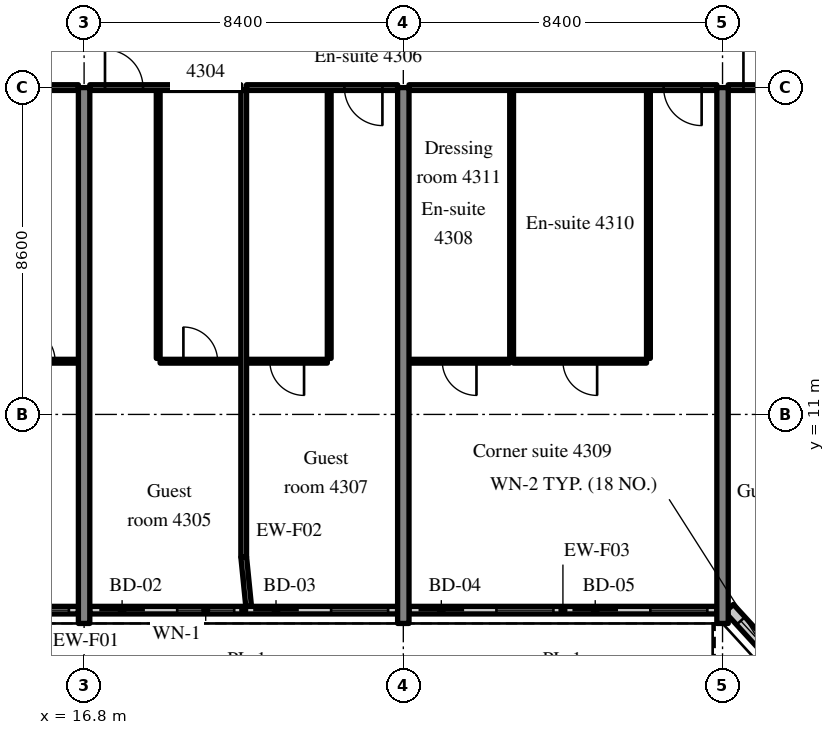
"""IFC4 building model, lengths in metres.
Left out: names, types, materials, properties, quantities, classifications, styles, units other than length and angle.
Written with IfcOpenShell. Run it as: python <this file> out.ifc"""

import sys

from ifc_helpers import new_model, si_unit, direction, frame, frame_2d, origin, place, context, subcontext, project, spatial, rectangle, extrude, source, transform, mapped, element, fill, save


model = new_model("IFC4")
c1 = context("Model", 3, precision=1e-05, world=origin(), true_north=direction((0.0, 1.0)))
c2 = subcontext(c1, "Body", "Model", "MODEL_VIEW")
j1 = project(units=[si_unit("LENGTHUNIT", "METRE"), si_unit("PLANEANGLEUNIT", "RADIAN")], contexts=[c1])
p1 = place(None, origin())
s1 = spatial("IfcSite", under=j1, at=p1, CompositionType="ELEMENT")
p2 = place(p1, origin())
s2 = spatial("IfcBuilding", under=s1, at=p2, CompositionType="ELEMENT")
p3 = place(p2, frame((0.0, 0.0, 178.2)))
s3 = spatial("IfcBuildingStorey", under=s2, at=p3, CompositionType="ELEMENT", Elevation=178.2)
m1 = source(origin(), c2, "Body", "SweptSolid", [
    extrude(rectangle(XDim=14.1, YDim=0.3, at=frame_2d((7.05, 0.0))), origin(), (0.0, 0.0, 1.0), 3.52),
])
for number, where, z_axis, x_axis in (
    (1, (16.8, 5.5, 0.0), (0.0, 0.0, 1.0), (0.0, 1.0, 0.0)),
    (2, (25.2, 5.5, 0.0), (0.0, 0.0, 1.0), (0.0, 1.0, 0.0)),
    (3, (33.6, 5.5, 0.0), (0.0, 0.0, 1.0), (0.0, 1.0, 0.0)),
):
    element("IfcWall", number, at=place(p3, frame(where, z_axis=z_axis, x_axis=x_axis)), inside=s3, PredefinedType="SHEAR", context=c2, shape_type="MappedRepresentation", body=[
        mapped(m1, transform((0.0, 0.0, 0.0), scale=1.0)),
    ])
m2 = source(origin(), c2, "Body", "SweptSolid", [
    extrude(rectangle(XDim=4.105, YDim=0.2, at=frame_2d((2.052, 0.0))), origin(), (0.0, 0.0, 1.0), 2.87),
])
p4 = place(p3, frame((12.545, 5.85, 0.0), z_axis=(0.0, 0.0, 1.0), x_axis=(1.0, 0.0, 0.0)))
e4 = element("IfcWall", 4, at=p4, inside=s3, PredefinedType="SOLIDWALL", context=c2, shape_type="MappedRepresentation", body=[
    mapped(m2, transform((0.0, 0.0, 0.0), scale=1.0)),
])
m3 = source(origin(), c2, "Body", "SweptSolid", [
    extrude(rectangle(XDim=1.2, YDim=2.4, at=frame_2d((0.6, 1.2))), frame((0.0, 0.11, 0.0), z_axis=(0.0, -1.0, 0.0), x_axis=(1.0, 0.0, 0.0)), (0.0, 0.0, 1.0), 0.22),
])
p5 = place(p4, frame((0.25, 0.0, 0.0)))
e5 = element("IfcOpeningElement", 5, at=p5, cuts=e4, PredefinedType="OPENING", context=c2, shape_type="MappedRepresentation", body=[
    mapped(m3, transform((0.0, 0.0, 0.0), scale=1.0)),
])
m4 = source(origin(), c2, "Body", "SweptSolid", [
    extrude(rectangle(XDim=1.5, YDim=1.5, at=frame_2d((0.75, 0.75))), frame((0.0, 0.11, 0.0), z_axis=(0.0, -1.0, 0.0), x_axis=(1.0, 0.0, 0.0)), (0.0, 0.0, 1.0), 0.22),
])
p6 = place(p4, frame((2.355, 0.0, 0.9)))
e6 = element("IfcOpeningElement", 6, at=p6, cuts=e4, PredefinedType="OPENING", context=c2, shape_type="MappedRepresentation", body=[
    mapped(m4, transform((0.0, 0.0, 0.0), scale=1.0)),
])
m5 = source(origin(), c2, "Body", "SweptSolid", [
    extrude(rectangle(XDim=8.1, YDim=0.2, at=frame_2d((4.05, 0.0))), origin(), (0.0, 0.0, 1.0), 2.87),
])
p7 = place(p3, frame((16.95, 5.85, 0.0), z_axis=(0.0, 0.0, 1.0), x_axis=(1.0, 0.0, 0.0)))
e7 = element("IfcWall", 7, at=p7, inside=s3, PredefinedType="SOLIDWALL", context=c2, shape_type="MappedRepresentation", body=[
    mapped(m5, transform((0.0, 0.0, 0.0), scale=1.0)),
])
p8 = place(p7, frame((0.25, 0.0, 0.0)))
e8 = element("IfcOpeningElement", 8, at=p8, cuts=e7, PredefinedType="OPENING", context=c2, shape_type="MappedRepresentation", body=[
    mapped(m3, transform((0.0, 0.0, 0.0), scale=1.0)),
])
p9 = place(p7, frame((2.3, 0.0, 0.9)))
e9 = element("IfcOpeningElement", 9, at=p9, cuts=e7, PredefinedType="OPENING", context=c2, shape_type="MappedRepresentation", body=[
    mapped(m4, transform((0.0, 0.0, 0.0), scale=1.0)),
])
p10 = place(p7, frame((4.3, 0.0, 0.0)))
e10 = element("IfcOpeningElement", 10, at=p10, cuts=e7, PredefinedType="OPENING", context=c2, shape_type="MappedRepresentation", body=[
    mapped(m3, transform((0.0, 0.0, 0.0), scale=1.0)),
])
p11 = place(p7, frame((6.35, 0.0, 0.9)))
e11 = element("IfcOpeningElement", 11, at=p11, cuts=e7, PredefinedType="OPENING", context=c2, shape_type="MappedRepresentation", body=[
    mapped(m4, transform((0.0, 0.0, 0.0), scale=1.0)),
])
m6 = source(origin(), c2, "Body", "SweptSolid", [
    extrude(rectangle(XDim=8.1, YDim=0.2, at=frame_2d((4.05, 0.0))), origin(), (0.0, 0.0, 1.0), 2.87),
])
p12 = place(p3, frame((25.35, 5.85, 0.0), z_axis=(0.0, 0.0, 1.0), x_axis=(1.0, 0.0, 0.0)))
e12 = element("IfcWall", 12, at=p12, inside=s3, PredefinedType="SOLIDWALL", context=c2, shape_type="MappedRepresentation", body=[
    mapped(m6, transform((0.0, 0.0, 0.0), scale=1.0)),
])
p13 = place(p12, frame((0.25, 0.0, 0.0)))
e13 = element("IfcOpeningElement", 13, at=p13, cuts=e12, PredefinedType="OPENING", context=c2, shape_type="MappedRepresentation", body=[
    mapped(m3, transform((0.0, 0.0, 0.0), scale=1.0)),
])
p14 = place(p12, frame((2.3, 0.0, 0.9)))
e14 = element("IfcOpeningElement", 14, at=p14, cuts=e12, PredefinedType="OPENING", context=c2, shape_type="MappedRepresentation", body=[
    mapped(m4, transform((0.0, 0.0, 0.0), scale=1.0)),
])
p15 = place(p12, frame((4.3, 0.0, 0.0)))
e15 = element("IfcOpeningElement", 15, at=p15, cuts=e12, PredefinedType="OPENING", context=c2, shape_type="MappedRepresentation", body=[
    mapped(m3, transform((0.0, 0.0, 0.0), scale=1.0)),
])
p16 = place(p12, frame((6.35, 0.0, 0.9)))
e16 = element("IfcOpeningElement", 16, at=p16, cuts=e12, PredefinedType="OPENING", context=c2, shape_type="MappedRepresentation", body=[
    mapped(m4, transform((0.0, 0.0, 0.0), scale=1.0)),
])
m7 = source(origin(), c2, "Body", "SweptSolid", [
    extrude(rectangle(XDim=2.398, YDim=0.3, at=frame_2d((1.199, 0.0))), origin(), (0.0, 0.0, 1.0), 3.52),
])
p17 = place(p3, frame((33.776, 5.9, 0.0), z_axis=(0.0, 0.0, 1.0), x_axis=(0.675374189419, -0.737475222815, 0.0)))
e17 = element("IfcWall", 17, at=p17, inside=s3, PredefinedType="SOLIDWALL", context=c2, shape_type="MappedRepresentation", body=[
    mapped(m7, transform((0.0, 0.0, 0.0), scale=1.0)),
])
m8 = source(origin(), c2, "Body", "SweptSolid", [
    extrude(rectangle(XDim=1.5, YDim=2.0, at=frame_2d((0.75, 1.0))), frame((0.0, 0.16, 0.0), z_axis=(0.0, -1.0, 0.0), x_axis=(1.0, 0.0, 0.0)), (0.0, 0.0, 1.0), 0.32),
])
p18 = place(p17, frame((0.449, 0.0, 0.9)))
e18 = element("IfcOpeningElement", 18, at=p18, cuts=e17, PredefinedType="OPENING", context=c2, shape_type="MappedRepresentation", body=[
    mapped(m8, transform((0.0, 0.0, 0.0), scale=1.0)),
])
m9 = source(origin(), c2, "Body", "SweptSolid", [
    extrude(rectangle(XDim=2.125, YDim=0.1, at=frame_2d((1.062, 0.0))), origin(), (0.0, 0.0, 1.0), 3.52),
])
p19 = place(p3, frame((14.525, 12.4, 0.0), z_axis=(0.0, 0.0, 1.0), x_axis=(1.0, 0.0, 0.0)))
e19 = element("IfcWall", 19, at=p19, inside=s3, PredefinedType="PARTITIONING", context=c2, shape_type="MappedRepresentation", body=[
    mapped(m9, transform((0.0, 0.0, 0.0), scale=1.0)),
])
m10 = source(origin(), c2, "Body", "SweptSolid", [
    extrude(rectangle(XDim=0.9, YDim=2.1, at=frame_2d((0.45, 1.05))), frame((0.0, 0.06, 0.0), z_axis=(0.0, -1.0, 0.0), x_axis=(1.0, 0.0, 0.0)), (0.0, 0.0, 1.0), 0.12),
])
p20 = place(p19, frame((0.612, 0.0, 0.0)))
e20 = element("IfcOpeningElement", 20, at=p20, cuts=e19, PredefinedType="OPENING", context=c2, shape_type="MappedRepresentation", body=[
    mapped(m10, transform((0.0, 0.0, 0.0), scale=1.0)),
])
m11 = source(origin(), c2, "Body", "SweptSolid", [
    extrude(rectangle(XDim=3.975, YDim=0.15, at=frame_2d((1.987, 0.0))), origin(), (0.0, 0.0, 1.0), 2.82),
])
p21 = place(p3, frame((12.675, 19.6, 0.0), z_axis=(0.0, 0.0, 1.0), x_axis=(1.0, 0.0, 0.0)))
e21 = element("IfcWall", 21, at=p21, inside=s3, PredefinedType="PARTITIONING", context=c2, shape_type="MappedRepresentation", body=[
    mapped(m11, transform((0.0, 0.0, 0.0), scale=1.0)),
])
m12 = source(origin(), c2, "Body", "SweptSolid", [
    extrude(rectangle(XDim=1.0, YDim=2.1, at=frame_2d((0.5, 1.05))), frame((0.0, 0.085, 0.0), z_axis=(0.0, -1.0, 0.0), x_axis=(1.0, 0.0, 0.0)), (0.0, 0.0, 1.0), 0.17),
])
p22 = place(p21, frame((0.4, 0.0, 0.0)))
e22 = element("IfcOpeningElement", 22, at=p22, cuts=e21, PredefinedType="OPENING", context=c2, shape_type="MappedRepresentation", body=[
    mapped(m12, transform((0.0, 0.0, 0.0), scale=1.0)),
])
m13 = source(origin(), c2, "Body", "SweptSolid", [
    extrude(rectangle(XDim=7.05, YDim=0.1, at=frame_2d((3.525, 0.0))), origin(), (0.0, 0.0, 1.0), 3.52),
])
p23 = place(p3, frame((18.75, 12.475, 0.0), z_axis=(0.0, 0.0, 1.0), x_axis=(0.0, 1.0, 0.0)))
e23 = element("IfcWall", 23, at=p23, inside=s3, PredefinedType="PARTITIONING", context=c2, shape_type="MappedRepresentation", body=[
    mapped(m13, transform((0.0, 0.0, 0.0), scale=1.0)),
])
p24 = place(p3, frame((18.8, 12.4, 0.0), z_axis=(0.0, 0.0, 1.0), x_axis=(1.0, 0.0, 0.0)))
e24 = element("IfcWall", 24, at=p24, inside=s3, PredefinedType="PARTITIONING", context=c2, shape_type="MappedRepresentation", body=[
    mapped(m9, transform((0.0, 0.0, 0.0), scale=1.0)),
])
p25 = place(p24, frame((0.613, 0.0, 0.0)))
e25 = element("IfcOpeningElement", 25, at=p25, cuts=e24, PredefinedType="OPENING", context=c2, shape_type="MappedRepresentation", body=[
    mapped(m10, transform((0.0, 0.0, 0.0), scale=1.0)),
])
m14 = source(origin(), c2, "Body", "SweptSolid", [
    extrude(rectangle(XDim=3.975, YDim=0.15, at=frame_2d((1.988, 0.0))), origin(), (0.0, 0.0, 1.0), 2.82),
])
p26 = place(p3, frame((16.95, 19.6, 0.0), z_axis=(0.0, 0.0, 1.0), x_axis=(1.0, 0.0, 0.0)))
e26 = element("IfcWall", 26, at=p26, inside=s3, PredefinedType="PARTITIONING", context=c2, shape_type="MappedRepresentation", body=[
    mapped(m14, transform((0.0, 0.0, 0.0), scale=1.0)),
])
p27 = place(p26, frame((0.4, 0.0, 0.0)))
e27 = element("IfcOpeningElement", 27, at=p27, cuts=e26, PredefinedType="OPENING", context=c2, shape_type="MappedRepresentation", body=[
    mapped(m12, transform((0.0, 0.0, 0.0), scale=1.0)),
])
p28 = place(p3, frame((23.25, 12.475, 0.0), z_axis=(0.0, 0.0, 1.0), x_axis=(0.0, 1.0, 0.0)))
e28 = element("IfcWall", 28, at=p28, inside=s3, PredefinedType="PARTITIONING", context=c2, shape_type="MappedRepresentation", body=[
    mapped(m13, transform((0.0, 0.0, 0.0), scale=1.0)),
])
p29 = place(p3, frame((21.075, 12.4, 0.0), z_axis=(0.0, 0.0, 1.0), x_axis=(1.0, 0.0, 0.0)))
e29 = element("IfcWall", 29, at=p29, inside=s3, PredefinedType="PARTITIONING", context=c2, shape_type="MappedRepresentation", body=[
    mapped(m9, transform((0.0, 0.0, 0.0), scale=1.0)),
])
p30 = place(p29, frame((0.613, 0.0, 0.0)))
e30 = element("IfcOpeningElement", 30, at=p30, cuts=e29, PredefinedType="OPENING", context=c2, shape_type="MappedRepresentation", body=[
    mapped(m10, transform((0.0, 0.0, 0.0), scale=1.0)),
])
p31 = place(p3, frame((21.075, 19.6, 0.0), z_axis=(0.0, 0.0, 1.0), x_axis=(1.0, 0.0, 0.0)))
e31 = element("IfcWall", 31, at=p31, inside=s3, PredefinedType="PARTITIONING", context=c2, shape_type="MappedRepresentation", body=[
    mapped(m14, transform((0.0, 0.0, 0.0), scale=1.0)),
])
p32 = place(p31, frame((2.575, 0.0, 0.0)))
e32 = element("IfcOpeningElement", 32, at=p32, cuts=e31, PredefinedType="OPENING", context=c2, shape_type="MappedRepresentation", body=[
    mapped(m12, transform((0.0, 0.0, 0.0), scale=1.0)),
])
m15 = source(origin(), c2, "Body", "SweptSolid", [
    extrude(rectangle(XDim=12.275, YDim=0.15, at=frame_2d((6.137, 0.0))), origin(), (0.0, 0.0, 1.0), 3.52),
])
p33 = place(p3, frame((21.0, 7.25, 0.0), z_axis=(0.0, 0.0, 1.0), x_axis=(0.0, 1.0, 0.0)))
e33 = element("IfcWall", 33, at=p33, inside=s3, PredefinedType="PARTITIONING", context=c2, shape_type="MappedRepresentation", body=[
    mapped(m15, transform((0.0, 0.0, 0.0), scale=1.0)),
])
for number, where, z_axis, x_axis in (
    (34, (31.65, 12.475, 0.0), (0.0, 0.0, 1.0), (0.0, 1.0, 0.0)),
    (35, (28.05, 12.475, 0.0), (0.0, 0.0, 1.0), (0.0, 1.0, 0.0)),
):
    element("IfcWall", number, at=place(p3, frame(where, z_axis=z_axis, x_axis=x_axis)), inside=s3, PredefinedType="PARTITIONING", context=c2, shape_type="MappedRepresentation", body=[
        mapped(m13, transform((0.0, 0.0, 0.0), scale=1.0)),
    ])
m16 = source(origin(), c2, "Body", "SweptSolid", [
    extrude(rectangle(XDim=3.5, YDim=0.1, at=frame_2d((1.75, 0.0))), origin(), (0.0, 0.0, 1.0), 3.52),
])
p34 = place(p3, frame((28.1, 12.4, 0.0), z_axis=(0.0, 0.0, 1.0), x_axis=(1.0, 0.0, 0.0)))
e36 = element("IfcWall", 36, at=p34, inside=s3, PredefinedType="PARTITIONING", context=c2, shape_type="MappedRepresentation", body=[
    mapped(m16, transform((0.0, 0.0, 0.0), scale=1.0)),
])
p35 = place(p34, frame((1.3, 0.0, 0.0)))
e37 = element("IfcOpeningElement", 37, at=p35, cuts=e36, PredefinedType="OPENING", context=c2, shape_type="MappedRepresentation", body=[
    mapped(m10, transform((0.0, 0.0, 0.0), scale=1.0)),
])
m17 = source(origin(), c2, "Body", "SweptSolid", [
    extrude(rectangle(XDim=2.65, YDim=0.1, at=frame_2d((1.325, 0.0))), origin(), (0.0, 0.0, 1.0), 3.52),
])
p36 = place(p3, frame((25.35, 12.4, 0.0), z_axis=(0.0, 0.0, 1.0), x_axis=(1.0, 0.0, 0.0)))
e38 = element("IfcWall", 38, at=p36, inside=s3, PredefinedType="PARTITIONING", context=c2, shape_type="MappedRepresentation", body=[
    mapped(m17, transform((0.0, 0.0, 0.0), scale=1.0)),
])
p37 = place(p36, frame((0.875, 0.0, 0.0)))
e39 = element("IfcOpeningElement", 39, at=p37, cuts=e38, PredefinedType="OPENING", context=c2, shape_type="MappedRepresentation", body=[
    mapped(m10, transform((0.0, 0.0, 0.0), scale=1.0)),
])
m18 = source(origin(), c2, "Body", "SweptSolid", [
    extrude(rectangle(XDim=8.1, YDim=0.15, at=frame_2d((4.05, 0.0))), origin(), (0.0, 0.0, 1.0), 2.82),
])
p38 = place(p3, frame((25.35, 19.6, 0.0), z_axis=(0.0, 0.0, 1.0), x_axis=(1.0, 0.0, 0.0)))
e40 = element("IfcWall", 40, at=p38, inside=s3, PredefinedType="PARTITIONING", context=c2, shape_type="MappedRepresentation", body=[
    mapped(m18, transform((0.0, 0.0, 0.0), scale=1.0)),
])
p39 = place(p38, frame((6.7, 0.0, 0.0)))
e41 = element("IfcOpeningElement", 41, at=p39, cuts=e40, PredefinedType="OPENING", context=c2, shape_type="MappedRepresentation", body=[
    mapped(m12, transform((0.0, 0.0, 0.0), scale=1.0)),
])
p40 = place(p3, frame((33.75, 19.6, 0.0), z_axis=(0.0, 0.0, 1.0), x_axis=(1.0, 0.0, 0.0)))
e42 = element("IfcWall", 42, at=p40, inside=s3, PredefinedType="PARTITIONING", context=c2, shape_type="MappedRepresentation", body=[
    mapped(m14, transform((0.0, 0.0, 0.0), scale=1.0)),
])
p41 = place(p40, frame((0.4, 0.0, 0.0)))
e43 = element("IfcOpeningElement", 43, at=p41, cuts=e42, PredefinedType="OPENING", context=c2, shape_type="MappedRepresentation", body=[
    mapped(m12, transform((0.0, 0.0, 0.0), scale=1.0)),
])
m19 = source(origin(), c2, "Body", "SweptSolid", [
    extrude(rectangle(XDim=1.307, YDim=0.15, at=frame_2d((0.653, 0.0))), origin(), (0.0, 0.0, 1.0), 3.52),
])
p42 = place(p3, frame((21.13, 5.95, 0.0), z_axis=(0.0, 0.0, 1.0), x_axis=(-0.099411212066, 0.995046436562, 0.0)))
e44 = element("IfcWall", 44, at=p42, inside=s3, PredefinedType="PARTITIONING", context=c2, shape_type="MappedRepresentation", body=[
    mapped(m19, transform((0.0, 0.0, 0.0), scale=1.0)),
])
m20 = source(origin(), c2, "Body", "SweptSolid", [
    extrude(rectangle(XDim=1.5, YDim=1.5, at=frame_2d((0.75, 0.75))), frame((0.0, 0.03, 0.0), z_axis=(0.0, -1.0, 0.0), x_axis=(1.0, 0.0, 0.0)), (0.0, 0.0, 1.0), 0.06),
])
p43 = place(p6, origin())
e45 = element("IfcWindow", 45, at=p43, inside=s3, PartitioningType="SINGLE_PANEL", PredefinedType="WINDOW", context=c2, shape_type="MappedRepresentation", body=[
    mapped(m20, transform((0.0, 0.0, 0.0), scale=1.0)),
])
fill(e6, e45)
m21 = source(origin(), c2, "Body", "SweptSolid", [
    extrude(rectangle(XDim=1.2, YDim=2.4, at=frame_2d((0.6, 1.2))), frame((0.0, 0.025, 0.0), z_axis=(0.0, -1.0, 0.0), x_axis=(1.0, 0.0, 0.0)), (0.0, 0.0, 1.0), 0.05),
])
p44 = place(p8, origin())
e46 = element("IfcDoor", 46, at=p44, inside=s3, OperationType="SLIDING_TO_RIGHT", PredefinedType="DOOR", context=c2, shape_type="MappedRepresentation", body=[
    mapped(m21, transform((0.0, 0.0, 0.0), scale=1.0)),
])
fill(e8, e46)
p45 = place(p9, origin())
e47 = element("IfcWindow", 47, at=p45, inside=s3, PartitioningType="SINGLE_PANEL", PredefinedType="WINDOW", context=c2, shape_type="MappedRepresentation", body=[
    mapped(m20, transform((0.0, 0.0, 0.0), scale=1.0)),
])
fill(e9, e47)
p46 = place(p10, origin())
e48 = element("IfcDoor", 48, at=p46, inside=s3, OperationType="SLIDING_TO_LEFT", PredefinedType="DOOR", context=c2, shape_type="MappedRepresentation", body=[
    mapped(m21, transform((0.0, 0.0, 0.0), scale=1.0)),
])
fill(e10, e48)
p47 = place(p11, origin())
e49 = element("IfcWindow", 49, at=p47, inside=s3, PartitioningType="SINGLE_PANEL", PredefinedType="WINDOW", context=c2, shape_type="MappedRepresentation", body=[
    mapped(m20, transform((0.0, 0.0, 0.0), scale=1.0)),
])
fill(e11, e49)
p48 = place(p13, origin())
e50 = element("IfcDoor", 50, at=p48, inside=s3, OperationType="SLIDING_TO_RIGHT", PredefinedType="DOOR", context=c2, shape_type="MappedRepresentation", body=[
    mapped(m21, transform((0.0, 0.0, 0.0), scale=1.0)),
])
fill(e13, e50)
p49 = place(p14, origin())
e51 = element("IfcWindow", 51, at=p49, inside=s3, PartitioningType="SINGLE_PANEL", PredefinedType="WINDOW", context=c2, shape_type="MappedRepresentation", body=[
    mapped(m20, transform((0.0, 0.0, 0.0), scale=1.0)),
])
fill(e14, e51)
p50 = place(p15, origin())
e52 = element("IfcDoor", 52, at=p50, inside=s3, OperationType="SLIDING_TO_LEFT", PredefinedType="DOOR", context=c2, shape_type="MappedRepresentation", body=[
    mapped(m21, transform((0.0, 0.0, 0.0), scale=1.0)),
])
fill(e15, e52)
p51 = place(p16, origin())
e53 = element("IfcWindow", 53, at=p51, inside=s3, PartitioningType="SINGLE_PANEL", PredefinedType="WINDOW", context=c2, shape_type="MappedRepresentation", body=[
    mapped(m20, transform((0.0, 0.0, 0.0), scale=1.0)),
])
fill(e16, e53)
m22 = source(origin(), c2, "Body", "SweptSolid", [
    extrude(rectangle(XDim=1.5, YDim=2.0, at=frame_2d((0.75, 1.0))), frame((0.0, 0.03, 0.0), z_axis=(0.0, -1.0, 0.0), x_axis=(1.0, 0.0, 0.0)), (0.0, 0.0, 1.0), 0.06),
])
p52 = place(p18, origin())
e54 = element("IfcWindow", 54, at=p52, inside=s3, PartitioningType="SINGLE_PANEL", PredefinedType="WINDOW", context=c2, shape_type="MappedRepresentation", body=[
    mapped(m22, transform((0.0, 0.0, 0.0), scale=1.0)),
])
fill(e18, e54)
m23 = source(origin(), c2, "Body", "SweptSolid", [
    extrude(rectangle(XDim=0.9, YDim=2.1, at=frame_2d((0.45, 1.05))), frame((0.0, 0.025, 0.0), z_axis=(0.0, -1.0, 0.0), x_axis=(1.0, 0.0, 0.0)), (0.0, 0.0, 1.0), 0.05),
])
p53 = place(p20, origin())
e55 = element("IfcDoor", 55, at=p53, inside=s3, OperationType="SINGLE_SWING_LEFT", PredefinedType="DOOR", context=c2, shape_type="MappedRepresentation", body=[
    mapped(m23, transform((0.0, 0.0, 0.0), scale=1.0)),
])
fill(e20, e55)
p54 = place(p25, origin())
e56 = element("IfcDoor", 56, at=p54, inside=s3, OperationType="SINGLE_SWING_LEFT", PredefinedType="DOOR", context=c2, shape_type="MappedRepresentation", body=[
    mapped(m23, transform((0.0, 0.0, 0.0), scale=1.0)),
])
fill(e25, e56)
m24 = source(origin(), c2, "Body", "SweptSolid", [
    extrude(rectangle(XDim=1.0, YDim=2.1, at=frame_2d((0.5, 1.05))), frame((0.0, 0.025, 0.0), z_axis=(0.0, -1.0, 0.0), x_axis=(1.0, 0.0, 0.0)), (0.0, 0.0, 1.0), 0.05),
])
p55 = place(p27, origin())
e57 = element("IfcDoor", 57, at=p55, inside=s3, OperationType="SINGLE_SWING_LEFT", PredefinedType="DOOR", context=c2, shape_type="MappedRepresentation", body=[
    mapped(m24, transform((0.0, 0.0, 0.0), scale=1.0)),
])
fill(e27, e57)
p56 = place(p30, origin())
e58 = element("IfcDoor", 58, at=p56, inside=s3, OperationType="SINGLE_SWING_RIGHT", PredefinedType="DOOR", context=c2, shape_type="MappedRepresentation", body=[
    mapped(m23, transform((0.0, 0.0, 0.0), scale=1.0)),
])
fill(e30, e58)
p57 = place(p32, origin())
e59 = element("IfcDoor", 59, at=p57, inside=s3, OperationType="SINGLE_SWING_RIGHT", PredefinedType="DOOR", context=c2, shape_type="MappedRepresentation", body=[
    mapped(m24, transform((0.0, 0.0, 0.0), scale=1.0)),
])
fill(e32, e59)
p58 = place(p35, origin())
e60 = element("IfcDoor", 60, at=p58, inside=s3, OperationType="SINGLE_SWING_RIGHT", PredefinedType="DOOR", context=c2, shape_type="MappedRepresentation", body=[
    mapped(m23, transform((0.0, 0.0, 0.0), scale=1.0)),
])
fill(e37, e60)
p59 = place(p37, origin())
e61 = element("IfcDoor", 61, at=p59, inside=s3, OperationType="SINGLE_SWING_RIGHT", PredefinedType="DOOR", context=c2, shape_type="MappedRepresentation", body=[
    mapped(m23, transform((0.0, 0.0, 0.0), scale=1.0)),
])
fill(e39, e61)
p60 = place(p39, origin())
e62 = element("IfcDoor", 62, at=p60, inside=s3, OperationType="SINGLE_SWING_RIGHT", PredefinedType="DOOR", context=c2, shape_type="MappedRepresentation", body=[
    mapped(m24, transform((0.0, 0.0, 0.0), scale=1.0)),
])
fill(e41, e62)
p61 = place(p41, origin())
e63 = element("IfcDoor", 63, at=p61, inside=s3, OperationType="SINGLE_SWING_LEFT", PredefinedType="DOOR", context=c2, shape_type="MappedRepresentation", body=[
    mapped(m24, transform((0.0, 0.0, 0.0), scale=1.0)),
])
fill(e43, e63)
save(model, sys.argv[1])
